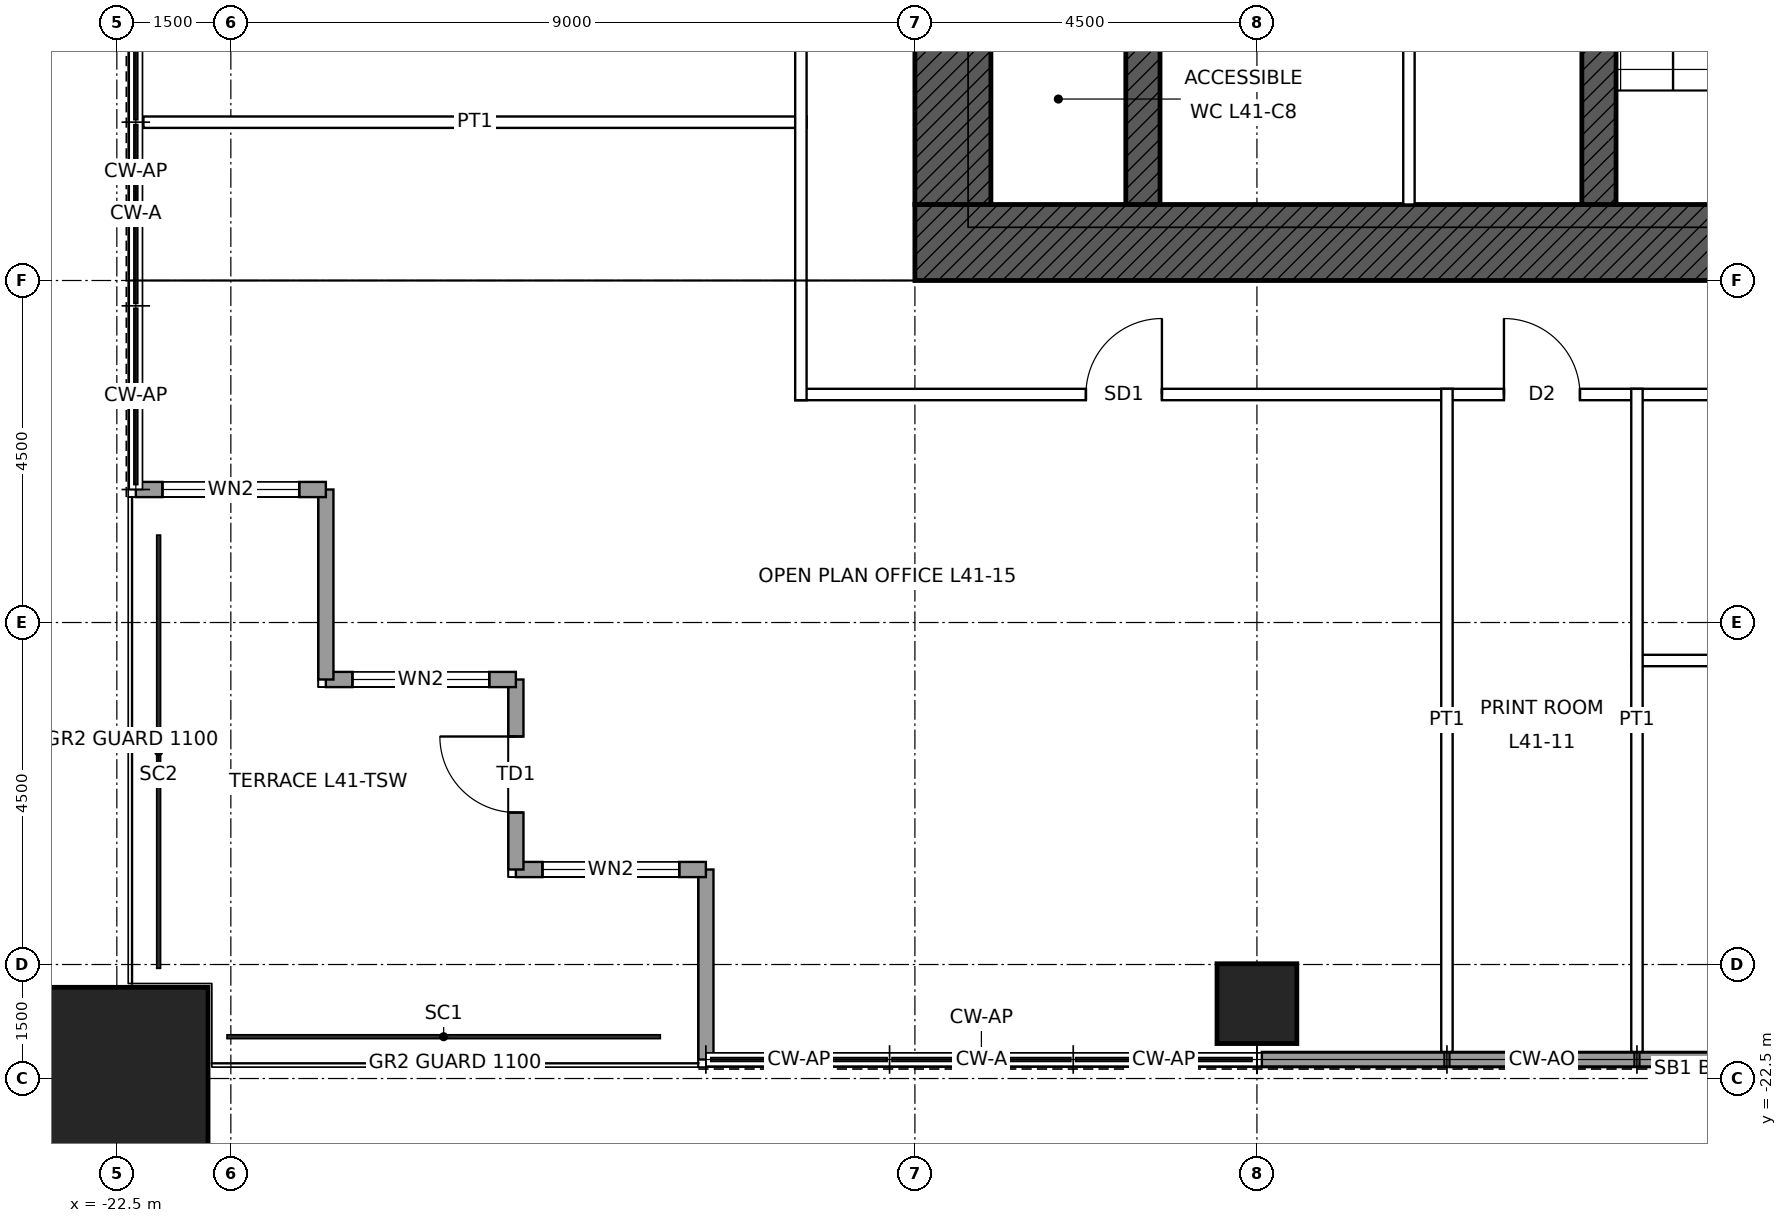
"""IFC4 building model, lengths in metres.
Left out: names, types, materials, properties, quantities, classifications, styles, units other than length and angle.
Written with IfcOpenShell. Run it as: python <this file> out.ifc"""

import sys

from ifc_helpers import new_model, si_unit, direction, frame, frame_2d, origin, origin_2d, place, context, subcontext, project, spatial, rectangle, hollow_rectangle, extrude, element, fill, save


model = new_model("IFC4")
c1 = context("Model", 3, precision=1e-05, world=origin(), true_north=direction((0.0, 1.0)))
c2 = subcontext(c1, "Body", "Model", "MODEL_VIEW")
j1 = project(units=[si_unit("LENGTHUNIT", "METRE"), si_unit("PLANEANGLEUNIT", "RADIAN")], contexts=[c1])
p1 = place(None, origin())
s1 = spatial("IfcSite", under=j1, at=p1, CompositionType="ELEMENT")
p2 = place(p1, origin())
s2 = spatial("IfcBuilding", under=s1, at=p2, CompositionType="ELEMENT")
p3 = place(p2, frame((0.0, 0.0, 197.9)))
s3 = spatial("IfcBuildingStorey", under=s2, at=p3, CompositionType="ELEMENT", Elevation=197.9)
p4 = place(p3, frame((-22.5, -22.5, 0.0), z_axis=(0.0, 0.0, 1.0), x_axis=(1.0, 0.0, 0.0)))
e1 = element("IfcColumn", 1, at=p4, inside=s3, PredefinedType="COLUMN", context=c2, shape_type="SweptSolid", body=[
    extrude(hollow_rectangle(XDim=2.4, YDim=2.4, WallThickness=0.12, at=origin_2d()), origin(), (0.0, 0.0, 1.0), 4.0),
])
p5 = place(p3, frame((-7.5, -21.515, 0.0), z_axis=(0.0, 0.0, 1.0), x_axis=(1.0, 0.0, 0.0)))
e2 = element("IfcColumn", 2, at=p5, inside=s3, PredefinedType="COLUMN", context=c2, shape_type="SweptSolid", body=[
    extrude(hollow_rectangle(XDim=1.05, YDim=1.05, WallThickness=0.07, at=origin_2d()), origin(), (0.0, 0.0, 1.0), 4.0),
])
p6 = place(p3, frame((12.0, -11.5, 0.0), z_axis=(0.0, 0.0, 1.0), x_axis=(-1.0, 0.0, 0.0)))
e3 = element("IfcWall", 3, at=p6, inside=s3, PredefinedType="SHEAR", context=c2, shape_type="SweptSolid", body=[
    extrude(rectangle(XDim=24.0, YDim=1.0, at=frame_2d((12.0, 0.0))), origin(), (0.0, 0.0, 1.0), 4.0),
])
p7 = place(p6, frame((11.5, 0.0, 0.0)))
e4 = element("IfcOpeningElement", 4, at=p7, cuts=e3, PredefinedType="OPENING", context=c2, shape_type="SweptSolid", body=[
    extrude(rectangle(XDim=1.0, YDim=2.1, at=frame_2d((0.5, 1.05))), frame((0.0, 0.51, 0.0), z_axis=(0.0, -1.0, 0.0), x_axis=(1.0, 0.0, 0.0)), (0.0, 0.0, 1.0), 1.02),
])
p8 = place(p6, frame((1.0, 0.0, 0.0)))
e5 = element("IfcOpeningElement", 5, at=p8, cuts=e3, PredefinedType="OPENING", context=c2, shape_type="SweptSolid", body=[
    extrude(rectangle(XDim=1.0, YDim=2.4, at=frame_2d((0.5, 1.2))), frame((0.0, 0.51, 0.0), z_axis=(0.0, -1.0, 0.0), x_axis=(1.0, 0.0, 0.0)), (0.0, 0.0, 1.0), 1.02),
])
p9 = place(p3, frame((-11.5, -11.0, 0.0), z_axis=(0.0, 0.0, 1.0), x_axis=(0.0, 1.0, 0.0)))
e6 = element("IfcWall", 6, at=p9, inside=s3, PredefinedType="SHEAR", context=c2, shape_type="SweptSolid", body=[
    extrude(rectangle(XDim=22.0, YDim=1.0, at=frame_2d((11.0, 0.0))), origin(), (0.0, 0.0, 1.0), 4.0),
])
p10 = place(p9, frame((10.5, 0.0, 0.0)))
e7 = element("IfcOpeningElement", 7, at=p10, cuts=e6, PredefinedType="OPENING", context=c2, shape_type="SweptSolid", body=[
    extrude(rectangle(XDim=1.0, YDim=2.4, at=frame_2d((0.5, 1.2))), frame((0.0, 0.51, 0.0), z_axis=(0.0, -1.0, 0.0), x_axis=(1.0, 0.0, 0.0)), (0.0, 0.0, 1.0), 1.02),
])
p11 = place(p3, frame((-9.0, -11.0, 0.0), z_axis=(0.0, 0.0, 1.0), x_axis=(0.0, 1.0, 0.0)))
e8 = element("IfcWall", 8, at=p11, inside=s3, PredefinedType="SHEAR", context=c2, shape_type="SweptSolid", body=[
    extrude(rectangle(XDim=6.5, YDim=0.45, at=frame_2d((3.25, 0.0))), origin(), (0.0, 0.0, 1.0), 4.0),
])
p12 = place(p11, frame((4.25, 0.0, 0.0)))
e9 = element("IfcOpeningElement", 9, at=p12, cuts=e8, PredefinedType="OPENING", context=c2, shape_type="SweptSolid", body=[
    extrude(rectangle(XDim=1.0, YDim=2.1, at=frame_2d((0.5, 1.05))), frame((0.0, 0.235, 0.0), z_axis=(0.0, -1.0, 0.0), x_axis=(1.0, 0.0, 0.0)), (0.0, 0.0, 1.0), 0.47),
])
p13 = place(p3, frame((-3.0, -11.0, 0.0), z_axis=(0.0, 0.0, 1.0), x_axis=(0.0, 1.0, 0.0)))
e10 = element("IfcWall", 10, at=p13, inside=s3, PredefinedType="SHEAR", context=c2, shape_type="SweptSolid", body=[
    extrude(rectangle(XDim=6.5, YDim=0.45, at=frame_2d((3.25, 0.0))), origin(), (0.0, 0.0, 1.0), 4.0),
])
p14 = place(p3, frame((-14.75, -22.25, 0.0), z_axis=(0.0, 0.0, 1.0), x_axis=(0.0, 1.0, 0.0)))
e11 = element("IfcWall", 11, at=p14, inside=s3, PredefinedType="SOLIDWALL", context=c2, shape_type="SweptSolid", body=[
    extrude(rectangle(XDim=2.5, YDim=0.2, at=frame_2d((1.25, 0.0))), origin(), (0.0, 0.0, 1.0), 3.85),
])
p15 = place(p3, frame((-14.75, -19.75, 0.0), z_axis=(0.0, 0.0, 1.0), x_axis=(-1.0, 0.0, 0.0)))
e12 = element("IfcWall", 12, at=p15, inside=s3, PredefinedType="SOLIDWALL", context=c2, shape_type="SweptSolid", body=[
    extrude(rectangle(XDim=2.5, YDim=0.2, at=frame_2d((1.25, 0.0))), origin(), (0.0, 0.0, 1.0), 3.85),
])
p16 = place(p15, frame((0.35, 0.0, 0.3)))
e13 = element("IfcOpeningElement", 13, at=p16, cuts=e12, PredefinedType="OPENING", context=c2, shape_type="SweptSolid", body=[
    extrude(rectangle(XDim=1.8, YDim=2.4, at=frame_2d((0.9, 1.2))), frame((0.0, 0.11, 0.0), z_axis=(0.0, -1.0, 0.0), x_axis=(1.0, 0.0, 0.0)), (0.0, 0.0, 1.0), 0.22),
])
p17 = place(p3, frame((-17.25, -19.75, 0.0), z_axis=(0.0, 0.0, 1.0), x_axis=(0.0, 1.0, 0.0)))
e14 = element("IfcWall", 14, at=p17, inside=s3, PredefinedType="SOLIDWALL", context=c2, shape_type="SweptSolid", body=[
    extrude(rectangle(XDim=2.5, YDim=0.2, at=frame_2d((1.25, 0.0))), origin(), (0.0, 0.0, 1.0), 3.85),
])
p18 = place(p17, frame((0.75, 0.0, 0.0)))
e15 = element("IfcOpeningElement", 15, at=p18, cuts=e14, PredefinedType="OPENING", context=c2, shape_type="SweptSolid", body=[
    extrude(rectangle(XDim=1.0, YDim=2.4, at=frame_2d((0.5, 1.2))), frame((0.0, 0.11, 0.0), z_axis=(0.0, -1.0, 0.0), x_axis=(1.0, 0.0, 0.0)), (0.0, 0.0, 1.0), 0.22),
])
p19 = place(p3, frame((-17.25, -17.25, 0.0), z_axis=(0.0, 0.0, 1.0), x_axis=(-1.0, 0.0, 0.0)))
e16 = element("IfcWall", 16, at=p19, inside=s3, PredefinedType="SOLIDWALL", context=c2, shape_type="SweptSolid", body=[
    extrude(rectangle(XDim=2.5, YDim=0.2, at=frame_2d((1.25, 0.0))), origin(), (0.0, 0.0, 1.0), 3.85),
])
p20 = place(p19, frame((0.35, 0.0, 0.3)))
e17 = element("IfcOpeningElement", 17, at=p20, cuts=e16, PredefinedType="OPENING", context=c2, shape_type="SweptSolid", body=[
    extrude(rectangle(XDim=1.8, YDim=2.4, at=frame_2d((0.9, 1.2))), frame((0.0, 0.11, 0.0), z_axis=(0.0, -1.0, 0.0), x_axis=(1.0, 0.0, 0.0)), (0.0, 0.0, 1.0), 0.22),
])
p21 = place(p3, frame((-19.75, -17.25, 0.0), z_axis=(0.0, 0.0, 1.0), x_axis=(0.0, 1.0, 0.0)))
e18 = element("IfcWall", 18, at=p21, inside=s3, PredefinedType="SOLIDWALL", context=c2, shape_type="SweptSolid", body=[
    extrude(rectangle(XDim=2.5, YDim=0.2, at=frame_2d((1.25, 0.0))), origin(), (0.0, 0.0, 1.0), 3.85),
])
p22 = place(p3, frame((-19.75, -14.75, 0.0), z_axis=(0.0, 0.0, 1.0), x_axis=(-1.0, 0.0, 0.0)))
e19 = element("IfcWall", 19, at=p22, inside=s3, PredefinedType="SOLIDWALL", context=c2, shape_type="SweptSolid", body=[
    extrude(rectangle(XDim=2.5, YDim=0.2, at=frame_2d((1.25, 0.0))), origin(), (0.0, 0.0, 1.0), 3.85),
])
p23 = place(p22, frame((0.35, 0.0, 0.3)))
e20 = element("IfcOpeningElement", 20, at=p23, cuts=e19, PredefinedType="OPENING", context=c2, shape_type="SweptSolid", body=[
    extrude(rectangle(XDim=1.8, YDim=2.4, at=frame_2d((0.9, 1.2))), frame((0.0, 0.11, 0.0), z_axis=(0.0, -1.0, 0.0), x_axis=(1.0, 0.0, 0.0)), (0.0, 0.0, 1.0), 0.22),
])
p24 = place(p3, frame((-0.065, -22.25, 0.0), z_axis=(0.0, 0.0, 1.0), x_axis=(-1.0, 0.0, 0.0)))
e21 = element("IfcWall", 21, at=p24, inside=s3, PredefinedType="SOLIDWALL", context=c2, shape_type="SweptSolid", body=[
    extrude(rectangle(XDim=2.403, YDim=0.2, at=frame_2d((1.201, 0.0))), origin(), (0.0, 0.0, 1.0), 3.85),
])
p25 = place(p3, frame((-2.532, -22.25, 0.0), z_axis=(0.0, 0.0, 1.0), x_axis=(-1.0, 0.0, 0.0)))
e22 = element("IfcWall", 22, at=p25, inside=s3, PredefinedType="SOLIDWALL", context=c2, shape_type="SweptSolid", body=[
    extrude(rectangle(XDim=2.435, YDim=0.2, at=frame_2d((1.218, 0.0))), origin(), (0.0, 0.0, 1.0), 3.85),
])
p26 = place(p3, frame((-5.032, -22.25, 0.0), z_axis=(0.0, 0.0, 1.0), x_axis=(-1.0, 0.0, 0.0)))
e23 = element("IfcWall", 23, at=p26, inside=s3, PredefinedType="SOLIDWALL", context=c2, shape_type="SweptSolid", body=[
    extrude(rectangle(XDim=2.403, YDim=0.2, at=frame_2d((1.201, 0.0))), origin(), (0.0, 0.0, 1.0), 3.85),
])
p27 = place(p3, frame((-2.575, -17.0, 0.0), z_axis=(0.0, 0.0, 1.0), x_axis=(1.0, 0.0, 0.0)))
e24 = element("IfcWall", 24, at=p27, inside=s3, PredefinedType="PARTITIONING", context=c2, shape_type="SweptSolid", body=[
    extrude(rectangle(XDim=5.15, YDim=0.15, at=frame_2d((2.575, 0.0))), origin(), (0.0, 0.0, 1.0), 3.85),
])
p28 = place(p27, frame((2.075, 0.0, 0.0)))
e25 = element("IfcOpeningElement", 25, at=p28, cuts=e24, PredefinedType="OPENING", context=c2, shape_type="SweptSolid", body=[
    extrude(rectangle(XDim=1.0, YDim=2.1, at=frame_2d((0.5, 1.05))), frame((0.0, 0.085, 0.0), z_axis=(0.0, -1.0, 0.0), x_axis=(1.0, 0.0, 0.0)), (0.0, 0.0, 1.0), 0.17),
])
p29 = place(p3, frame((-13.575, -13.5, 0.0), z_axis=(0.0, 0.0, 1.0), x_axis=(1.0, 0.0, 0.0)))
e26 = element("IfcWall", 26, at=p29, inside=s3, PredefinedType="PARTITIONING", context=c2, shape_type="SweptSolid", body=[
    extrude(rectangle(XDim=27.15, YDim=0.15, at=frame_2d((13.575, 0.0))), origin(), (0.0, 0.0, 1.0), 3.85),
])
p30 = place(p29, frame((19.283, 0.0, 0.0)))
e27 = element("IfcOpeningElement", 27, at=p30, cuts=e26, PredefinedType="OPENING", context=c2, shape_type="SweptSolid", body=[
    extrude(rectangle(XDim=1.0, YDim=2.4, at=frame_2d((0.5, 1.2))), frame((0.0, 0.085, 0.0), z_axis=(0.0, -1.0, 0.0), x_axis=(1.0, 0.0, 0.0)), (0.0, 0.0, 1.0), 0.17),
])
p31 = place(p29, frame((9.325, 0.0, 0.0)))
e28 = element("IfcOpeningElement", 28, at=p31, cuts=e26, PredefinedType="OPENING", context=c2, shape_type="SweptSolid", body=[
    extrude(rectangle(XDim=1.0, YDim=2.1, at=frame_2d((0.5, 1.05))), frame((0.0, 0.085, 0.0), z_axis=(0.0, -1.0, 0.0), x_axis=(1.0, 0.0, 0.0)), (0.0, 0.0, 1.0), 0.17),
])
p32 = place(p29, frame((3.825, 0.0, 0.0)))
e29 = element("IfcOpeningElement", 29, at=p32, cuts=e26, PredefinedType="OPENING", context=c2, shape_type="SweptSolid", body=[
    extrude(rectangle(XDim=1.0, YDim=2.4, at=frame_2d((0.5, 1.2))), frame((0.0, 0.085, 0.0), z_axis=(0.0, -1.0, 0.0), x_axis=(1.0, 0.0, 0.0)), (0.0, 0.0, 1.0), 0.17),
])
p33 = place(p29, frame((25.318, 0.0, 0.0)))
e30 = element("IfcOpeningElement", 30, at=p33, cuts=e26, PredefinedType="OPENING", context=c2, shape_type="SweptSolid", body=[
    extrude(rectangle(XDim=1.0, YDim=2.4, at=frame_2d((0.5, 1.2))), frame((0.0, 0.085, 0.0), z_axis=(0.0, -1.0, 0.0), x_axis=(1.0, 0.0, 0.0)), (0.0, 0.0, 1.0), 0.17),
])
p34 = place(p3, frame((-22.15, -9.917, 0.0), z_axis=(0.0, 0.0, 1.0), x_axis=(1.0, 0.0, 0.0)))
e31 = element("IfcWall", 31, at=p34, inside=s3, PredefinedType="PARTITIONING", context=c2, shape_type="SweptSolid", body=[
    extrude(rectangle(XDim=8.725, YDim=0.15, at=frame_2d((4.362, 0.0))), origin(), (0.0, 0.0, 1.0), 3.85),
])
p35 = place(p3, frame((-13.5, -13.575, 0.0), z_axis=(0.0, 0.0, 1.0), x_axis=(0.0, 1.0, 0.0)))
e32 = element("IfcWall", 32, at=p35, inside=s3, PredefinedType="PARTITIONING", context=c2, shape_type="SweptSolid", body=[
    extrude(rectangle(XDim=13.65, YDim=0.15, at=frame_2d((6.825, 0.0))), origin(), (0.0, 0.0, 1.0), 3.85),
])
for number, where, z_axis, x_axis in (
    (33, (-5.0, -22.15, 0.0), (0.0, 0.0, 1.0), (0.0, 1.0, 0.0)),
    (34, (-2.5, -22.15, 0.0), (0.0, 0.0, 1.0), (0.0, 1.0, 0.0)),
):
    element("IfcWall", number, at=place(p3, frame(where, z_axis=z_axis, x_axis=x_axis)), inside=s3, PredefinedType="PARTITIONING", context=c2, shape_type="SweptSolid", body=[
        extrude(rectangle(XDim=8.725, YDim=0.15, at=frame_2d((4.362, 0.0))), origin(), (0.0, 0.0, 1.0), 3.85),
    ])
p36 = place(p3, frame((-5.5, -11.0, 0.0), z_axis=(0.0, 0.0, 1.0), x_axis=(0.0, 1.0, 0.0)))
e35 = element("IfcWall", 35, at=p36, inside=s3, PredefinedType="PARTITIONING", context=c2, shape_type="SweptSolid", body=[
    extrude(rectangle(XDim=6.275, YDim=0.15, at=frame_2d((3.137, 0.0))), origin(), (0.0, 0.0, 1.0), 3.75),
])
p37 = place(p36, frame((2.637, 0.0, 0.0)))
e36 = element("IfcOpeningElement", 36, at=p37, cuts=e35, PredefinedType="OPENING", context=c2, shape_type="SweptSolid", body=[
    extrude(rectangle(XDim=1.0, YDim=2.1, at=frame_2d((0.5, 1.05))), frame((0.0, 0.085, 0.0), z_axis=(0.0, -1.0, 0.0), x_axis=(1.0, 0.0, 0.0)), (0.0, 0.0, 1.0), 0.17),
])
p38 = place(p16, origin())
e37 = element("IfcWindow", 37, at=p38, inside=s3, PartitioningType="SINGLE_PANEL", PredefinedType="WINDOW", context=c2, shape_type="SweptSolid", body=[
    extrude(rectangle(XDim=1.8, YDim=2.4, at=frame_2d((0.9, 1.2))), frame((0.0, 0.03, 0.0), z_axis=(0.0, -1.0, 0.0), x_axis=(1.0, 0.0, 0.0)), (0.0, 0.0, 1.0), 0.06),
])
fill(e13, e37)
p39 = place(p18, origin())
e38 = element("IfcDoor", 38, at=p39, inside=s3, OperationType="SINGLE_SWING_RIGHT", PredefinedType="DOOR", context=c2, shape_type="SweptSolid", body=[
    extrude(rectangle(XDim=1.0, YDim=2.4, at=frame_2d((0.5, 1.2))), frame((0.0, 0.025, 0.0), z_axis=(0.0, -1.0, 0.0), x_axis=(1.0, 0.0, 0.0)), (0.0, 0.0, 1.0), 0.05),
])
fill(e15, e38)
p40 = place(p20, origin())
e39 = element("IfcWindow", 39, at=p40, inside=s3, PartitioningType="SINGLE_PANEL", PredefinedType="WINDOW", context=c2, shape_type="SweptSolid", body=[
    extrude(rectangle(XDim=1.8, YDim=2.4, at=frame_2d((0.9, 1.2))), frame((0.0, 0.03, 0.0), z_axis=(0.0, -1.0, 0.0), x_axis=(1.0, 0.0, 0.0)), (0.0, 0.0, 1.0), 0.06),
])
fill(e17, e39)
p41 = place(p23, origin())
e40 = element("IfcWindow", 40, at=p41, inside=s3, PartitioningType="SINGLE_PANEL", PredefinedType="WINDOW", context=c2, shape_type="SweptSolid", body=[
    extrude(rectangle(XDim=1.8, YDim=2.4, at=frame_2d((0.9, 1.2))), frame((0.0, 0.03, 0.0), z_axis=(0.0, -1.0, 0.0), x_axis=(1.0, 0.0, 0.0)), (0.0, 0.0, 1.0), 0.06),
])
fill(e20, e40)
p42 = place(p31, origin())
e41 = element("IfcDoor", 41, at=p42, inside=s3, OperationType="SINGLE_SWING_LEFT", PredefinedType="DOOR", context=c2, shape_type="SweptSolid", body=[
    extrude(rectangle(XDim=1.0, YDim=2.1, at=frame_2d((0.5, 1.05))), frame((0.0, 0.025, 0.0), z_axis=(0.0, -1.0, 0.0), x_axis=(1.0, 0.0, 0.0)), (0.0, 0.0, 1.0), 0.05),
])
fill(e28, e41)
p43 = place(p32, origin())
e42 = element("IfcDoor", 42, at=p43, inside=s3, OperationType="SINGLE_SWING_RIGHT", PredefinedType="DOOR", context=c2, shape_type="SweptSolid", body=[
    extrude(rectangle(XDim=1.0, YDim=2.4, at=frame_2d((0.5, 1.2))), frame((0.0, 0.025, 0.0), z_axis=(0.0, -1.0, 0.0), x_axis=(1.0, 0.0, 0.0)), (0.0, 0.0, 1.0), 0.05),
])
fill(e29, e42)
save(model, sys.argv[1])
